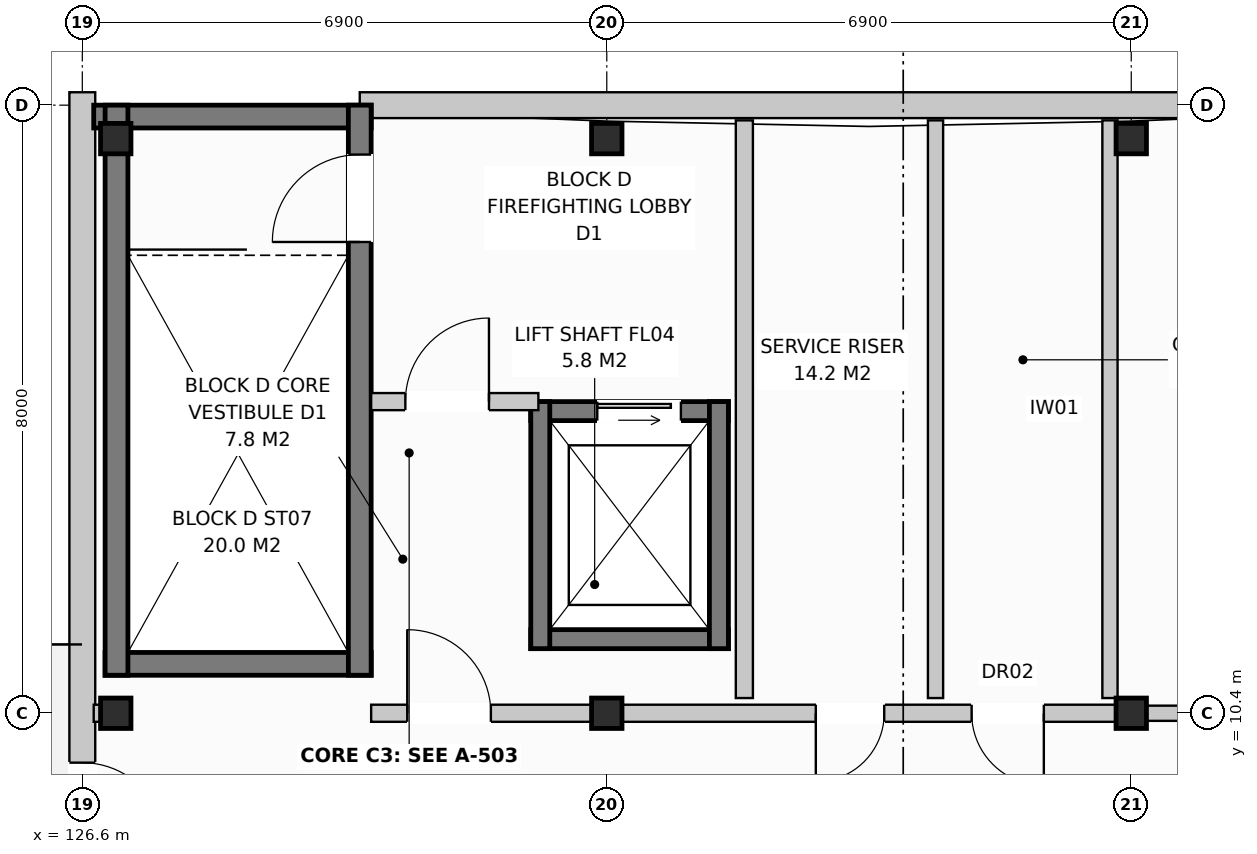
"""IFC4 building model, lengths in metres.
Left out: names, types, materials, properties, quantities, classifications, styles, units other than length and angle.
Written with IfcOpenShell. Run it as: python <this file> out.ifc"""

import sys

from ifc_helpers import new_model, si_unit, direction, frame, frame_2d, origin, origin_with_axes, origin_2d, place, context, subcontext, project, spatial, rectangle, extrude, element, fill, save


model = new_model("IFC4")
c1 = context("Model", 3, precision=1e-05, world=origin(), true_north=direction((0.0, 1.0)))
c2 = subcontext(c1, "Body", "Model", "MODEL_VIEW")
j1 = project(units=[si_unit("LENGTHUNIT", "METRE"), si_unit("PLANEANGLEUNIT", "RADIAN")], contexts=[c1])
p1 = place(None, origin())
s1 = spatial("IfcSite", under=j1, at=p1, CompositionType="ELEMENT")
p2 = place(p1, origin())
s2 = spatial("IfcBuilding", under=s1, at=p2, CompositionType="ELEMENT")
p3 = place(p2, frame((0.0, 0.0, 27.2)))
s3 = spatial("IfcBuildingStorey", under=s2, at=p3, CompositionType="ELEMENT", Elevation=27.2)
for number, where, z_axis, x_axis in (
    (1, (127.04, 10.4, 0.0), (0.0, 0.0, 1.0), (1.0, 0.0, 0.0)),
    (2, (127.04, 17.96, 0.0), (0.0, 0.0, 1.0), (1.0, 0.0, 0.0)),
    (3, (133.5, 10.4, 0.0), (0.0, 0.0, 1.0), (1.0, 0.0, 0.0)),
    (4, (133.5, 17.96, 0.0), (0.0, 0.0, 1.0), (1.0, 0.0, 0.0)),
    (5, (140.4, 10.4, 0.0), (0.0, 0.0, 1.0), (1.0, 0.0, 0.0)),
    (6, (140.4, 17.96, 0.0), (0.0, 0.0, 1.0), (1.0, 0.0, 0.0)),
):
    element("IfcColumn", number, at=place(p3, frame(where, z_axis=z_axis, x_axis=x_axis)), inside=s3, PredefinedType="COLUMN", context=c2, shape_type="SweptSolid", body=[
        extrude(rectangle(XDim=0.4, YDim=0.4, at=origin_2d()), origin(), (0.0, 0.0, 1.0), 3.2),
    ])
p4 = place(p3, frame((130.25, 18.4, 0.0), z_axis=(0.0, 0.0, 1.0), x_axis=(1.0, 0.0, 0.0)))
e7 = element("IfcWall", 7, at=p4, inside=s3, PredefinedType="STANDARD", context=c2, shape_type="SweptSolid", body=[
    extrude(rectangle(XDim=17.5, YDim=0.34, at=frame_2d((8.75, 0.0))), origin(), (0.0, 0.0, 1.0), 2.91),
])
p5 = place(p4, frame((11.965, 0.0, 0.0)))
e8 = element("IfcOpeningElement", 8, at=p5, cuts=e7, PredefinedType="OPENING", context=c2, shape_type="SweptSolid", body=[
    extrude(rectangle(XDim=0.95, YDim=2.1, at=frame_2d((0.475, 1.05))), frame((0.0, 0.182, 0.0), z_axis=(0.0, -1.0, 0.0), x_axis=(1.0, 0.0, 0.0)), (0.0, 0.0, 1.0), 0.364),
])
p6 = place(p4, frame((14.97, 0.0, 0.72)))
e9 = element("IfcOpeningElement", 9, at=p6, cuts=e7, PredefinedType="OPENING", context=c2, shape_type="SweptSolid", body=[
    extrude(rectangle(XDim=1.1, YDim=1.5, at=frame_2d((0.55, 0.75))), frame((0.0, 0.182, 0.0), z_axis=(0.0, -1.0, 0.0), x_axis=(1.0, 0.0, 0.0)), (0.0, 0.0, 1.0), 0.364),
])
p7 = place(p3, frame((126.6, -0.17, 0.0), z_axis=(0.0, 0.0, 1.0), x_axis=(0.0, 1.0, 0.0)))
e10 = element("IfcWall", 10, at=p7, inside=s3, PredefinedType="STANDARD", context=c2, shape_type="SweptSolid", body=[
    extrude(rectangle(XDim=18.74, YDim=0.34, at=frame_2d((9.37, 0.0))), origin(), (0.0, 0.0, 1.0), 2.91),
])
p8 = place(p7, frame((8.82, 0.0, 0.0)))
e11 = element("IfcOpeningElement", 11, at=p8, cuts=e10, PredefinedType="OPENING", context=c2, shape_type="SweptSolid", body=[
    extrude(rectangle(XDim=1.1, YDim=2.1, at=frame_2d((0.55, 1.05))), frame((0.0, 0.182, 0.0), z_axis=(0.0, -1.0, 0.0), x_axis=(1.0, 0.0, 0.0)), (0.0, 0.0, 1.0), 0.364),
])
p9 = place(p7, frame((1.72, 0.0, 0.72)))
e12 = element("IfcOpeningElement", 12, at=p9, cuts=e10, PredefinedType="OPENING", context=c2, shape_type="SweptSolid", body=[
    extrude(rectangle(XDim=1.1, YDim=1.5, at=frame_2d((0.55, 0.75))), frame((0.0, 0.182, 0.0), z_axis=(0.0, -1.0, 0.0), x_axis=(1.0, 0.0, 0.0)), (0.0, 0.0, 1.0), 0.364),
])
p10 = place(p3, frame((126.75, 18.25, 0.0), z_axis=(0.0, 0.0, 1.0), x_axis=(1.0, 0.0, 0.0)))
e13 = element("IfcWall", 13, at=p10, inside=s3, PredefinedType="SHEAR", context=c2, shape_type="SweptSolid", body=[
    extrude(rectangle(XDim=3.65, YDim=0.3, at=frame_2d((1.825, 0.0))), origin(), (0.0, 0.0, 1.0), 2.96),
])
p11 = place(p3, frame((126.9, 11.05, 0.0), z_axis=(0.0, 0.0, 1.0), x_axis=(1.0, 0.0, 0.0)))
e14 = element("IfcWall", 14, at=p11, inside=s3, PredefinedType="SHEAR", context=c2, shape_type="SweptSolid", body=[
    extrude(rectangle(XDim=3.5, YDim=0.3, at=frame_2d((1.75, 0.0))), origin(), (0.0, 0.0, 1.0), 2.96),
])
p12 = place(p3, frame((127.05, 10.9, 0.0), z_axis=(0.0, 0.0, 1.0), x_axis=(0.0, 1.0, 0.0)))
e15 = element("IfcWall", 15, at=p12, inside=s3, PredefinedType="SHEAR", context=c2, shape_type="SweptSolid", body=[
    extrude(rectangle(XDim=7.5, YDim=0.3, at=frame_2d((3.75, 0.0))), origin(), (0.0, 0.0, 1.0), 2.96),
])
p13 = place(p3, frame((130.25, 10.9, 0.0), z_axis=(0.0, 0.0, 1.0), x_axis=(0.0, 1.0, 0.0)))
e16 = element("IfcWall", 16, at=p13, inside=s3, PredefinedType="SHEAR", context=c2, shape_type="SweptSolid", body=[
    extrude(rectangle(XDim=7.5, YDim=0.3, at=frame_2d((3.75, 0.0))), origin(), (0.0, 0.0, 1.0), 2.96),
])
p14 = place(p13, frame((5.7, 0.0, 0.0)))
e17 = element("IfcOpeningElement", 17, at=p14, cuts=e16, PredefinedType="OPENING", context=c2, shape_type="SweptSolid", body=[
    extrude(rectangle(XDim=1.15, YDim=2.15, at=frame_2d((0.575, 1.075))), frame((0.0, 0.162, 0.0), z_axis=(0.0, -1.0, 0.0), x_axis=(1.0, 0.0, 0.0)), (0.0, 0.0, 1.0), 0.324),
])
p15 = place(p3, frame((132.5, 14.375, 0.0), z_axis=(0.0, 0.0, 1.0), x_axis=(1.0, 0.0, 0.0)))
e18 = element("IfcWall", 18, at=p15, inside=s3, PredefinedType="SHEAR", context=c2, shape_type="SweptSolid", body=[
    extrude(rectangle(XDim=2.6, YDim=0.25, at=frame_2d((1.3, 0.0))), origin(), (0.0, 0.0, 1.0), 2.96),
])
p16 = place(p15, frame((0.875, 0.0, 0.0)))
e19 = element("IfcOpeningElement", 19, at=p16, cuts=e18, PredefinedType="OPENING", context=c2, shape_type="SweptSolid", body=[
    extrude(rectangle(XDim=1.1, YDim=2.1, at=frame_2d((0.55, 1.05))), frame((0.0, 0.137, 0.0), z_axis=(0.0, -1.0, 0.0), x_axis=(1.0, 0.0, 0.0)), (0.0, 0.0, 1.0), 0.274),
])
p17 = place(p3, frame((132.5, 11.375, 0.0), z_axis=(0.0, 0.0, 1.0), x_axis=(1.0, 0.0, 0.0)))
e20 = element("IfcWall", 20, at=p17, inside=s3, PredefinedType="SHEAR", context=c2, shape_type="SweptSolid", body=[
    extrude(rectangle(XDim=2.6, YDim=0.25, at=frame_2d((1.3, 0.0))), origin(), (0.0, 0.0, 1.0), 2.96),
])
for number, where, z_axis, x_axis in (
    (21, (132.625, 11.25, 0.0), (0.0, 0.0, 1.0), (0.0, 1.0, 0.0)),
    (22, (134.975, 11.25, 0.0), (0.0, 0.0, 1.0), (0.0, 1.0, 0.0)),
):
    element("IfcWall", number, at=place(p3, frame(where, z_axis=z_axis, x_axis=x_axis)), inside=s3, PredefinedType="SHEAR", context=c2, shape_type="SweptSolid", body=[
        extrude(rectangle(XDim=3.25, YDim=0.25, at=frame_2d((1.625, 0.0))), origin(), (0.0, 0.0, 1.0), 2.96),
    ])
p18 = place(p3, frame((135.31, 10.6, 0.0), z_axis=(0.0, 0.0, 1.0), x_axis=(0.0, 1.0, 0.0)))
e23 = element("IfcWall", 23, at=p18, inside=s3, PredefinedType="PARTITIONING", context=c2, shape_type="SweptSolid", body=[
    extrude(rectangle(XDim=7.6, YDim=0.225, at=frame_2d((3.8, 0.0))), origin(), (0.0, 0.0, 1.0), 2.59),
])
p19 = place(p3, frame((130.4, 14.5, 0.0), z_axis=(0.0, 0.0, 1.0), x_axis=(1.0, 0.0, 0.0)))
e24 = element("IfcWall", 24, at=p19, inside=s3, PredefinedType="PARTITIONING", context=c2, shape_type="SweptSolid", body=[
    extrude(rectangle(XDim=2.2, YDim=0.225, at=frame_2d((1.1, 0.0))), origin(), (0.0, 0.0, 1.0), 2.96),
])
p20 = place(p19, frame((0.45, 0.0, 0.0)))
e25 = element("IfcOpeningElement", 25, at=p20, cuts=e24, PredefinedType="OPENING", context=c2, shape_type="SweptSolid", body=[
    extrude(rectangle(XDim=1.1, YDim=2.15, at=frame_2d((0.55, 1.075))), frame((0.0, 0.125, 0.0), z_axis=(0.0, -1.0, 0.0), x_axis=(1.0, 0.0, 0.0)), (0.0, 0.0, 1.0), 0.249),
])
p21 = place(p3, frame((126.75, 10.4, 0.0), z_axis=(0.0, 0.0, 1.0), x_axis=(1.0, 0.0, 0.0)))
e26 = element("IfcWall", 26, at=p21, inside=s3, PredefinedType="PARTITIONING", context=c2, shape_type="SweptSolid", body=[
    extrude(rectangle(XDim=0.15, YDim=0.225, at=frame_2d((0.075, 0.0))), origin(), (0.0, 0.0, 1.0), 2.96),
])
for number, where, z_axis, x_axis in (
    (27, (137.825, 10.6, 0.0), (0.0, 0.0, 1.0), (0.0, 1.0, 0.0)),
    (28, (140.12, 10.6, 0.0), (0.0, 0.0, 1.0), (0.0, 1.0, 0.0)),
):
    element("IfcWall", number, at=place(p3, frame(where, z_axis=z_axis, x_axis=x_axis)), inside=s3, PredefinedType="PARTITIONING", context=c2, shape_type="SweptSolid", body=[
        extrude(rectangle(XDim=7.6, YDim=0.2, at=frame_2d((3.8, 0.0))), origin(), (0.0, 0.0, 1.0), 2.96),
    ])
p22 = place(p3, frame((130.4, 10.4, 0.0), z_axis=(0.0, 0.0, 1.0), x_axis=(1.0, 0.0, 0.0)))
e29 = element("IfcWall", 29, at=p22, inside=s3, PredefinedType="PARTITIONING", context=c2, shape_type="SweptSolid", body=[
    extrude(rectangle(XDim=10.0, YDim=0.225, at=frame_2d((5.0, 0.0))), origin(), (0.0, 0.0, 1.0), 2.35),
])
p23 = place(p22, frame((0.475, 0.0, 0.0)))
e30 = element("IfcOpeningElement", 30, at=p23, cuts=e29, PredefinedType="OPENING", context=c2, shape_type="SweptSolid", body=[
    extrude(rectangle(XDim=1.1, YDim=2.15, at=frame_2d((0.55, 1.075))), frame((0.0, 0.125, 0.0), z_axis=(0.0, -1.0, 0.0), x_axis=(1.0, 0.0, 0.0)), (0.0, 0.0, 1.0), 0.249),
])
p24 = place(p22, frame((5.85, 0.0, 0.0)))
e31 = element("IfcOpeningElement", 31, at=p24, cuts=e29, PredefinedType="OPENING", context=c2, shape_type="SweptSolid", body=[
    extrude(rectangle(XDim=0.9, YDim=2.1, at=frame_2d((0.45, 1.05))), frame((0.0, 0.125, 0.0), z_axis=(0.0, -1.0, 0.0), x_axis=(1.0, 0.0, 0.0)), (0.0, 0.0, 1.0), 0.249),
])
p25 = place(p22, frame((7.9, 0.0, 0.0)))
e32 = element("IfcOpeningElement", 32, at=p25, cuts=e29, PredefinedType="OPENING", context=c2, shape_type="SweptSolid", body=[
    extrude(rectangle(XDim=0.95, YDim=2.15, at=frame_2d((0.475, 1.075))), frame((0.0, 0.125, 0.0), z_axis=(0.0, -1.0, 0.0), x_axis=(1.0, 0.0, 0.0)), (0.0, 0.0, 1.0), 0.249),
])
p26 = place(p3, frame((140.4, 10.4, 0.0), z_axis=(0.0, 0.0, 1.0), x_axis=(1.0, 0.0, 0.0)))
e33 = element("IfcWall", 33, at=p26, inside=s3, PredefinedType="PARTITIONING", context=c2, shape_type="SweptSolid", body=[
    extrude(rectangle(XDim=6.9, YDim=0.2, at=frame_2d((3.45, 0.0))), origin(), (0.0, 0.0, 1.0), 2.35),
])
p27 = place(p26, frame((2.0, 0.0, 0.0)))
e34 = element("IfcOpeningElement", 34, at=p27, cuts=e33, PredefinedType="OPENING", context=c2, shape_type="SweptSolid", body=[
    extrude(rectangle(XDim=0.95, YDim=2.15, at=frame_2d((0.475, 1.075))), frame((0.0, 0.112, 0.0), z_axis=(0.0, -1.0, 0.0), x_axis=(1.0, 0.0, 0.0)), (0.0, 0.0, 1.0), 0.224),
])
p28 = place(p8, frame((1.1, 0.0, 0.0), z_axis=(0.0, 0.0, 1.0), x_axis=(-1.0, 0.0, 0.0)))
e35 = element("IfcDoor", 35, at=p28, inside=s3, OperationType="SINGLE_SWING_LEFT", PredefinedType="DOOR", context=c2, shape_type="SweptSolid", body=[
    extrude(rectangle(XDim=1.1, YDim=2.1, at=frame_2d((0.55, 1.05))), frame((0.0, 0.025, 0.0), z_axis=(0.0, -1.0, 0.0), x_axis=(1.0, 0.0, 0.0)), (0.0, 0.0, 1.0), 0.05),
])
fill(e11, e35)
p29 = place(p14, origin_with_axes())
e36 = element("IfcDoor", 36, at=p29, inside=s3, OperationType="SINGLE_SWING_LEFT", PredefinedType="DOOR", context=c2, shape_type="SweptSolid", body=[
    extrude(rectangle(XDim=1.15, YDim=2.15, at=frame_2d((0.575, 1.075))), frame((0.0, 0.025, 0.0), z_axis=(0.0, -1.0, 0.0), x_axis=(1.0, 0.0, 0.0)), (0.0, 0.0, 1.0), 0.05),
])
fill(e17, e36)
p30 = place(p16, origin_with_axes())
e37 = element("IfcDoor", 37, at=p30, inside=s3, OperationType="SLIDING_TO_LEFT", PredefinedType="DOOR", context=c2, shape_type="SweptSolid", body=[
    extrude(rectangle(XDim=1.1, YDim=2.1, at=frame_2d((0.55, 1.05))), frame((0.0, 0.025, 0.0), z_axis=(0.0, -1.0, 0.0), x_axis=(1.0, 0.0, 0.0)), (0.0, 0.0, 1.0), 0.05),
])
fill(e19, e37)
p31 = place(p20, origin_with_axes())
e38 = element("IfcDoor", 38, at=p31, inside=s3, OperationType="SINGLE_SWING_RIGHT", PredefinedType="DOOR", context=c2, shape_type="SweptSolid", body=[
    extrude(rectangle(XDim=1.1, YDim=2.15, at=frame_2d((0.55, 1.075))), frame((0.0, 0.025, 0.0), z_axis=(0.0, -1.0, 0.0), x_axis=(1.0, 0.0, 0.0)), (0.0, 0.0, 1.0), 0.05),
])
fill(e25, e38)
p32 = place(p23, origin_with_axes())
e39 = element("IfcDoor", 39, at=p32, inside=s3, OperationType="SINGLE_SWING_LEFT", PredefinedType="DOOR", context=c2, shape_type="SweptSolid", body=[
    extrude(rectangle(XDim=1.1, YDim=2.15, at=frame_2d((0.55, 1.075))), frame((0.0, 0.025, 0.0), z_axis=(0.0, -1.0, 0.0), x_axis=(1.0, 0.0, 0.0)), (0.0, 0.0, 1.0), 0.05),
])
fill(e30, e39)
p33 = place(p24, frame((0.9, 0.0, 0.0), z_axis=(0.0, 0.0, 1.0), x_axis=(-1.0, 0.0, 0.0)))
e40 = element("IfcDoor", 40, at=p33, inside=s3, OperationType="SINGLE_SWING_LEFT", PredefinedType="DOOR", context=c2, shape_type="SweptSolid", body=[
    extrude(rectangle(XDim=0.9, YDim=2.1, at=frame_2d((0.45, 1.05))), frame((0.0, 0.025, 0.0), z_axis=(0.0, -1.0, 0.0), x_axis=(1.0, 0.0, 0.0)), (0.0, 0.0, 1.0), 0.05),
])
fill(e31, e40)
p34 = place(p25, frame((0.95, 0.0, 0.0), z_axis=(0.0, 0.0, 1.0), x_axis=(-1.0, 0.0, 0.0)))
e41 = element("IfcDoor", 41, at=p34, inside=s3, OperationType="SINGLE_SWING_RIGHT", PredefinedType="DOOR", context=c2, shape_type="SweptSolid", body=[
    extrude(rectangle(XDim=0.95, YDim=2.15, at=frame_2d((0.475, 1.075))), frame((0.0, 0.025, 0.0), z_axis=(0.0, -1.0, 0.0), x_axis=(1.0, 0.0, 0.0)), (0.0, 0.0, 1.0), 0.05),
])
fill(e32, e41)
save(model, sys.argv[1])
